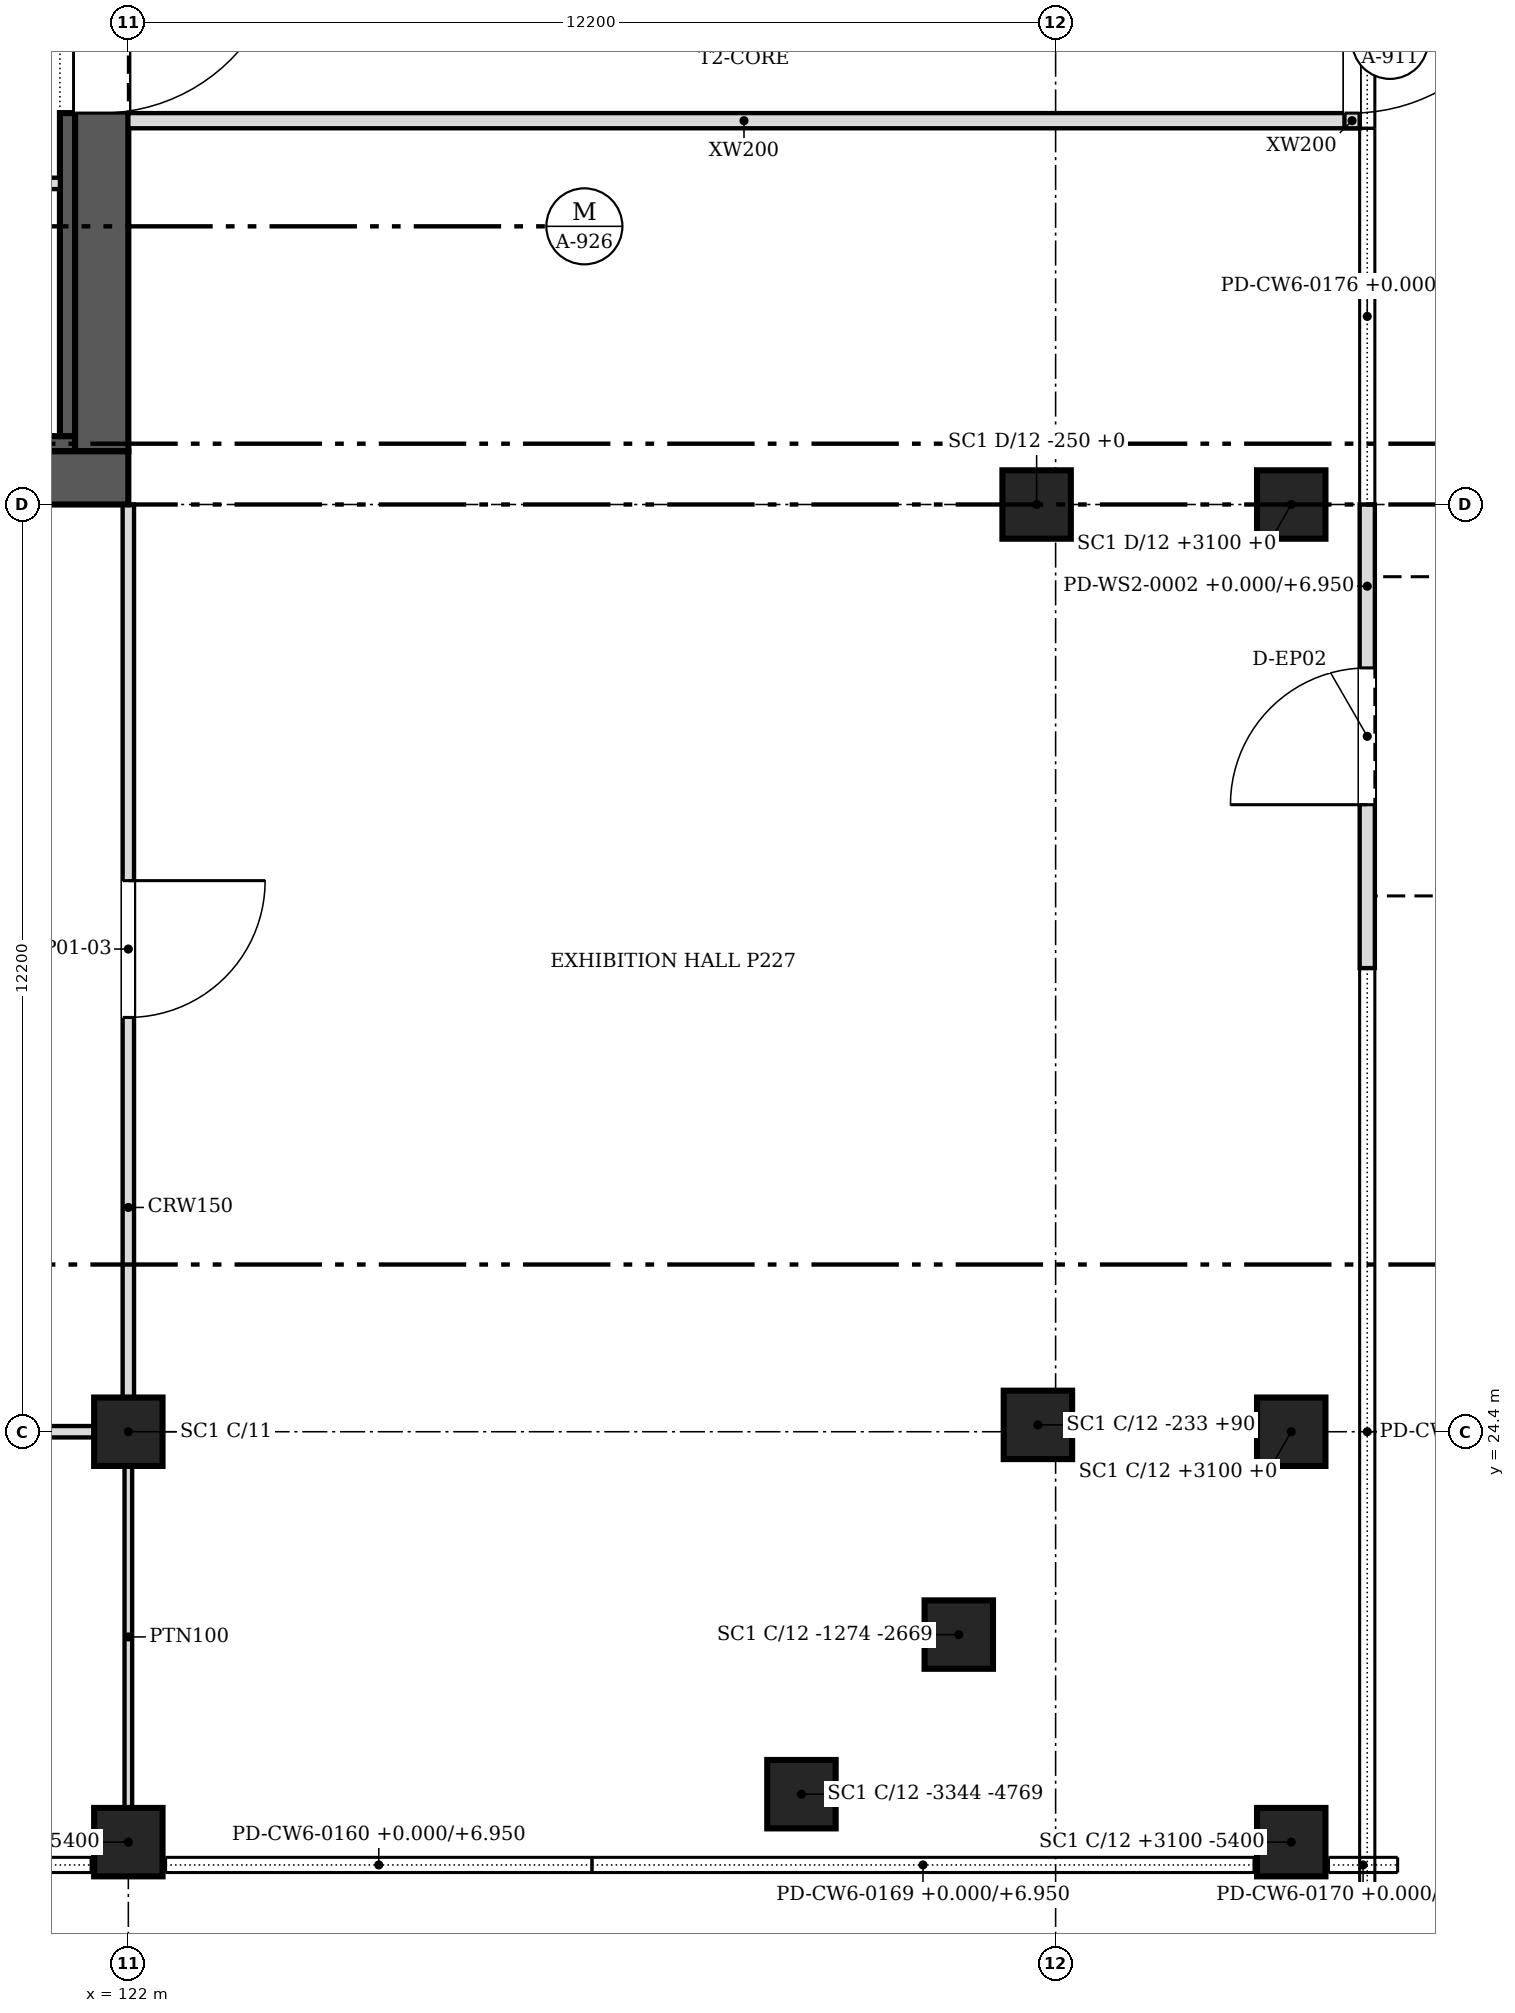
"""IFC4 building model, lengths in metres.
Left out: names, types, materials, properties, quantities, classifications, styles, units other than length and angle.
Written with IfcOpenShell. Run it as: python <this file> out.ifc"""

import sys

from ifc_helpers import new_model, si_unit, direction, frame, frame_2d, origin, origin_2d, place, context, subcontext, project, spatial, polyline, rectangle, outline, extrude, source, transform, mapped, element, fill, save


model = new_model("IFC4")
c1 = context("Model", 3, precision=1e-05, world=origin(), true_north=direction((0.0, 1.0)))
c2 = subcontext(c1, "Body", "Model", "MODEL_VIEW")
j1 = project(units=[si_unit("LENGTHUNIT", "METRE"), si_unit("PLANEANGLEUNIT", "RADIAN")], contexts=[c1])
p1 = place(None, origin())
s1 = spatial("IfcSite", under=j1, at=p1, CompositionType="ELEMENT")
p2 = place(p1, origin())
s2 = spatial("IfcBuilding", under=s1, at=p2, CompositionType="ELEMENT")
p3 = place(p2, origin())
s3 = spatial("IfcBuildingStorey", under=s2, at=p3, CompositionType="ELEMENT", Elevation=0.0)
for number, where, z_axis, x_axis in (
    (1, (130.856, 19.631, 0.0), (0.0, 0.0, 1.0), (1.0, 0.0, 0.0)),
    (2, (132.926, 21.731, 0.0), (0.0, 0.0, 1.0), (1.0, 0.0, 0.0)),
    (3, (133.967, 24.49, 0.0), (0.0, 0.0, 1.0), (1.0, 0.0, 0.0)),
    (4, (133.95, 36.6, 0.0), (0.0, 0.0, 1.0), (1.0, 0.0, 0.0)),
    (5, (122.0, 24.4, 0.0), (0.0, 0.0, 1.0), (1.0, 0.0, 0.0)),
    (6, (137.3, 36.6, 0.0), (0.0, 0.0, 1.0), (1.0, 0.0, 0.0)),
    (7, (137.3, 24.4, 0.0), (0.0, 0.0, 1.0), (1.0, 0.0, 0.0)),
    (8, (122.0, 19.0, 0.0), (0.0, 0.0, 1.0), (1.0, 0.0, 0.0)),
    (9, (137.3, 19.0, 0.0), (0.0, 0.0, 1.0), (1.0, 0.0, 0.0)),
):
    element("IfcColumn", number, at=place(p3, frame(where, z_axis=z_axis, x_axis=x_axis)), inside=s3, PredefinedType="COLUMN", context=c2, shape_type="SweptSolid", body=[
        extrude(rectangle(XDim=0.9, YDim=0.9, at=origin_2d()), origin(), (0.0, 0.0, 1.0), 6.95),
    ])
p4 = place(p3, frame((138.3, 30.5, 0.0), z_axis=(0.0, 0.0, 1.0), x_axis=(0.0, 1.0, 0.0)))
e10 = element("IfcWall", 10, at=p4, inside=s3, PredefinedType="PARTITIONING", context=c2, shape_type="SweptSolid", body=[
    extrude(rectangle(XDim=6.1, YDim=0.2, at=frame_2d((3.05, 0.0))), origin(), (0.0, 0.0, 1.0), 6.95),
])
m1 = source(origin(), c2, "Body", "SweptSolid", [
    extrude(rectangle(XDim=1.8, YDim=3.0, at=frame_2d((0.9, 1.5))), frame((0.0, 0.11, 0.0), z_axis=(0.0, -1.0, 0.0), x_axis=(1.0, 0.0, 0.0)), (0.0, 0.0, 1.0), 0.22),
])
p5 = place(p4, frame((2.15, 0.0, 0.0)))
e11 = element("IfcOpeningElement", 11, at=p5, cuts=e10, PredefinedType="OPENING", context=c2, shape_type="MappedRepresentation", body=[
    mapped(m1, transform((0.0, 0.0, 0.0), scale=1.0)),
])
m2 = source(origin(), c2, "Body", "SweptSolid", [
    extrude(outline(polyline([(0.12, 0.1), (2.03, 0.1), (2.03, 6.85), (0.12, 6.85), (0.12, 0.1)])), frame((0.0, 0.11, 0.0), z_axis=(0.0, -1.0, 0.0), x_axis=(1.0, 0.0, 0.0)), (0.0, 0.0, 1.0), 0.22),
])
p6 = place(p4, origin())
e12 = element("IfcOpeningElement", 12, at=p6, cuts=e10, PredefinedType="OPENING", context=c2, shape_type="MappedRepresentation", body=[
    mapped(m2, transform((0.0, 0.0, 0.0), scale=1.0)),
])
m3 = source(origin(), c2, "Body", "SweptSolid", [
    extrude(outline(polyline([(4.07, 0.1), (5.98, 0.1), (5.98, 6.85), (4.07, 6.85), (4.07, 0.1)])), frame((0.0, 0.11, 0.0), z_axis=(0.0, -1.0, 0.0), x_axis=(1.0, 0.0, 0.0)), (0.0, 0.0, 1.0), 0.22),
])
p7 = place(p4, origin())
e13 = element("IfcOpeningElement", 13, at=p7, cuts=e10, PredefinedType="OPENING", context=c2, shape_type="MappedRepresentation", body=[
    mapped(m3, transform((0.0, 0.0, 0.0), scale=1.0)),
])
m4 = source(origin(), c2, "Body", "SweptSolid", [
    extrude(outline(polyline([(2.15, 3.12), (3.95, 3.12), (3.95, 6.85), (2.15, 6.85), (2.15, 3.12)])), frame((0.0, 0.11, 0.0), z_axis=(0.0, -1.0, 0.0), x_axis=(1.0, 0.0, 0.0)), (0.0, 0.0, 1.0), 0.22),
])
p8 = place(p4, origin())
e14 = element("IfcOpeningElement", 14, at=p8, cuts=e10, PredefinedType="OPENING", context=c2, shape_type="MappedRepresentation", body=[
    mapped(m4, transform((0.0, 0.0, 0.0), scale=1.0)),
])
p9 = place(p3, frame((122.0, 36.95, 0.0), z_axis=(0.0, 0.0, 1.0), x_axis=(-1.0, 0.0, 0.0)))
e15 = element("IfcWall", 15, at=p9, inside=s3, PredefinedType="SHEAR", context=c2, shape_type="SweptSolid", body=[
    extrude(rectangle(XDim=24.4, YDim=0.7, at=frame_2d((12.2, 0.0))), origin(), (0.0, 0.0, 1.0), 7.2),
])
p10 = place(p3, frame((121.65, 48.1, 0.0), z_axis=(0.0, 0.0, 1.0), x_axis=(0.0, -1.0, 0.0)))
e16 = element("IfcWall", 16, at=p10, inside=s3, PredefinedType="SHEAR", context=c2, shape_type="SweptSolid", body=[
    extrude(rectangle(XDim=10.8, YDim=0.7, at=frame_2d((5.4, 0.0))), origin(), (0.0, 0.0, 1.0), 7.2),
])
m5 = source(origin(), c2, "Body", "SweptSolid", [
    extrude(rectangle(XDim=2.4, YDim=2.1, at=frame_2d((1.2, 1.05))), frame((0.0, 0.36, 0.0), z_axis=(0.0, -1.0, 0.0), x_axis=(1.0, 0.0, 0.0)), (0.0, 0.0, 1.0), 0.72),
])
p11 = place(p10, frame((3.95, 0.0, 0.0)))
e17 = element("IfcOpeningElement", 17, at=p11, cuts=e16, PredefinedType="OPENING", context=c2, shape_type="MappedRepresentation", body=[
    mapped(m5, transform((0.0, 0.0, 0.0), scale=1.0)),
])
p12 = place(p3, frame((98.3, 37.4, 0.0), z_axis=(0.0, 0.0, 1.0), x_axis=(1.0, 0.0, 0.0)))
e18 = element("IfcWall", 18, at=p12, inside=s3, PredefinedType="SOLIDWALL", context=c2, shape_type="SweptSolid", body=[
    extrude(rectangle(XDim=23.0, YDim=0.2, at=frame_2d((11.5, 0.0))), origin(), (0.0, 0.0, 1.0), 7.2),
])
p13 = place(p3, frame((121.2, 37.5, 0.0), z_axis=(0.0, 0.0, 1.0), x_axis=(0.0, 1.0, 0.0)))
e19 = element("IfcWall", 19, at=p13, inside=s3, PredefinedType="SOLIDWALL", context=c2, shape_type="SweptSolid", body=[
    extrude(rectangle(XDim=4.25, YDim=0.2, at=frame_2d((2.125, 0.0))), origin(), (0.0, 0.0, 1.0), 7.2),
])
p14 = place(p3, frame((121.1, 40.825, 0.0), z_axis=(0.0, 0.0, 1.0), x_axis=(-1.0, 0.0, 0.0)))
e20 = element("IfcWall", 20, at=p14, inside=s3, PredefinedType="PARTITIONING", context=c2, shape_type="SweptSolid", body=[
    extrude(rectangle(XDim=3.0, YDim=0.15, at=frame_2d((1.5, 0.0))), origin(), (0.0, 0.0, 1.0), 6.95),
])
m6 = source(origin(), c2, "Body", "SweptSolid", [
    extrude(rectangle(XDim=0.9, YDim=2.1, at=frame_2d((0.45, 1.05))), frame((0.0, 0.085, 0.0), z_axis=(0.0, -1.0, 0.0), x_axis=(1.0, 0.0, 0.0)), (0.0, 0.0, 1.0), 0.17),
])
p15 = place(p14, frame((1.05, 0.0, 0.0)))
e21 = element("IfcOpeningElement", 21, at=p15, cuts=e20, PredefinedType="OPENING", context=c2, shape_type="MappedRepresentation", body=[
    mapped(m6, transform((0.0, 0.0, 0.0), scale=1.0)),
])
p16 = place(p3, frame((122.0, 41.65, 0.0), z_axis=(0.0, 0.0, 1.0), x_axis=(1.0, 0.0, 0.0)))
e22 = element("IfcWall", 22, at=p16, inside=s3, PredefinedType="PARTITIONING", context=c2, shape_type="SweptSolid", body=[
    extrude(rectangle(XDim=16.2, YDim=0.2, at=frame_2d((8.1, 0.0))), origin(), (0.0, 0.0, 1.0), 6.115),
])
p17 = place(p3, frame((138.1, 44.35, 0.0), z_axis=(0.0, 0.0, 1.0), x_axis=(0.0, -1.0, 0.0)))
e23 = element("IfcWall", 23, at=p17, inside=s3, PredefinedType="PARTITIONING", context=c2, shape_type="SweptSolid", body=[
    extrude(rectangle(XDim=2.8, YDim=0.2, at=frame_2d((1.4, 0.0))), origin(), (0.0, 0.0, 1.0), 6.115),
])
m7 = source(origin(), c2, "Body", "SweptSolid", [
    extrude(rectangle(XDim=2.4, YDim=2.1, at=frame_2d((1.2, 1.05))), frame((0.0, 0.11, 0.0), z_axis=(0.0, -1.0, 0.0), x_axis=(1.0, 0.0, 0.0)), (0.0, 0.0, 1.0), 0.22),
])
p18 = place(p17, frame((0.2, 0.0, 0.0)))
e24 = element("IfcOpeningElement", 24, at=p18, cuts=e23, PredefinedType="OPENING", context=c2, shape_type="MappedRepresentation", body=[
    mapped(m7, transform((0.0, 0.0, 0.0), scale=1.0)),
])
p19 = place(p3, frame((122.0, 19.451, 0.0), z_axis=(0.0, 0.0, 1.0), x_axis=(0.0, 1.0, 0.0)))
e25 = element("IfcWall", 25, at=p19, inside=s3, PredefinedType="PARTITIONING", context=c2, shape_type="SweptSolid", body=[
    extrude(rectangle(XDim=4.498, YDim=0.1, at=frame_2d((2.249, 0.0))), origin(), (0.0, 0.0, 1.0), 6.115),
])
p20 = place(p3, frame((110.251, 24.4, 0.0), z_axis=(0.0, 0.0, 1.0), x_axis=(1.0, 0.0, 0.0)))
e26 = element("IfcWall", 26, at=p20, inside=s3, PredefinedType="PARTITIONING", context=c2, shape_type="SweptSolid", body=[
    extrude(rectangle(XDim=11.298, YDim=0.15, at=frame_2d((5.649, 0.0))), origin(), (0.0, 0.0, 1.0), 6.115),
])
p21 = place(p3, frame((122.0, 36.6, 0.0), z_axis=(0.0, 0.0, 1.0), x_axis=(0.0, -1.0, 0.0)))
e27 = element("IfcWall", 27, at=p21, inside=s3, PredefinedType="PARTITIONING", context=c2, shape_type="SweptSolid", body=[
    extrude(rectangle(XDim=11.749, YDim=0.15, at=frame_2d((5.875, 0.0))), origin(), (0.0, 0.0, 1.0), 6.115),
])
m8 = source(origin(), c2, "Body", "SweptSolid", [
    extrude(rectangle(XDim=1.8, YDim=2.1, at=frame_2d((0.9, 1.05))), frame((0.0, 0.085, 0.0), z_axis=(0.0, -1.0, 0.0), x_axis=(1.0, 0.0, 0.0)), (0.0, 0.0, 1.0), 0.17),
])
p22 = place(p21, frame((4.949, 0.0, 0.0)))
e28 = element("IfcOpeningElement", 28, at=p22, cuts=e27, PredefinedType="OPENING", context=c2, shape_type="MappedRepresentation", body=[
    mapped(m8, transform((0.0, 0.0, 0.0), scale=1.0)),
])
m9 = source(origin(), c2, "Body", "SweptSolid", [
    extrude(rectangle(XDim=1.8, YDim=3.0, at=frame_2d((0.9, 1.5))), frame((0.0, 0.025, 0.0), z_axis=(0.0, -1.0, 0.0), x_axis=(1.0, 0.0, 0.0)), (0.0, 0.0, 1.0), 0.05),
])
p23 = place(p5, origin())
e29 = element("IfcDoor", 29, at=p23, inside=s3, OperationType="DOUBLE_DOOR_SINGLE_SWING", PredefinedType="DOOR", context=c2, shape_type="MappedRepresentation", body=[
    mapped(m9, transform((0.0, 0.0, 0.0), scale=1.0)),
])
fill(e11, e29)
m10 = source(origin(), c2, "Body", "SweptSolid", [
    extrude(rectangle(XDim=2.4, YDim=2.1, at=frame_2d((1.2, 1.05))), frame((0.0, 0.025, 0.0), z_axis=(0.0, -1.0, 0.0), x_axis=(1.0, 0.0, 0.0)), (0.0, 0.0, 1.0), 0.05),
])
p24 = place(p11, origin())
e30 = element("IfcDoor", 30, at=p24, inside=s3, OperationType="SINGLE_SWING_LEFT", PredefinedType="DOOR", context=c2, shape_type="MappedRepresentation", body=[
    mapped(m10, transform((0.0, 0.0, 0.0), scale=1.0)),
])
fill(e17, e30)
p25 = place(p18, origin())
e31 = element("IfcDoor", 31, at=p25, inside=s3, OperationType="DOUBLE_DOOR_SINGLE_SWING", PredefinedType="DOOR", context=c2, shape_type="MappedRepresentation", body=[
    mapped(m10, transform((0.0, 0.0, 0.0), scale=1.0)),
])
fill(e24, e31)
m11 = source(origin(), c2, "Body", "SweptSolid", [
    extrude(rectangle(XDim=1.8, YDim=2.1, at=frame_2d((0.9, 1.05))), frame((0.0, 0.025, 0.0), z_axis=(0.0, -1.0, 0.0), x_axis=(1.0, 0.0, 0.0)), (0.0, 0.0, 1.0), 0.05),
])
p26 = place(p22, origin())
e32 = element("IfcDoor", 32, at=p26, inside=s3, OperationType="DOUBLE_DOOR_SINGLE_SWING", PredefinedType="DOOR", context=c2, shape_type="MappedRepresentation", body=[
    mapped(m11, transform((0.0, 0.0, 0.0), scale=1.0)),
])
fill(e28, e32)
save(model, sys.argv[1])
